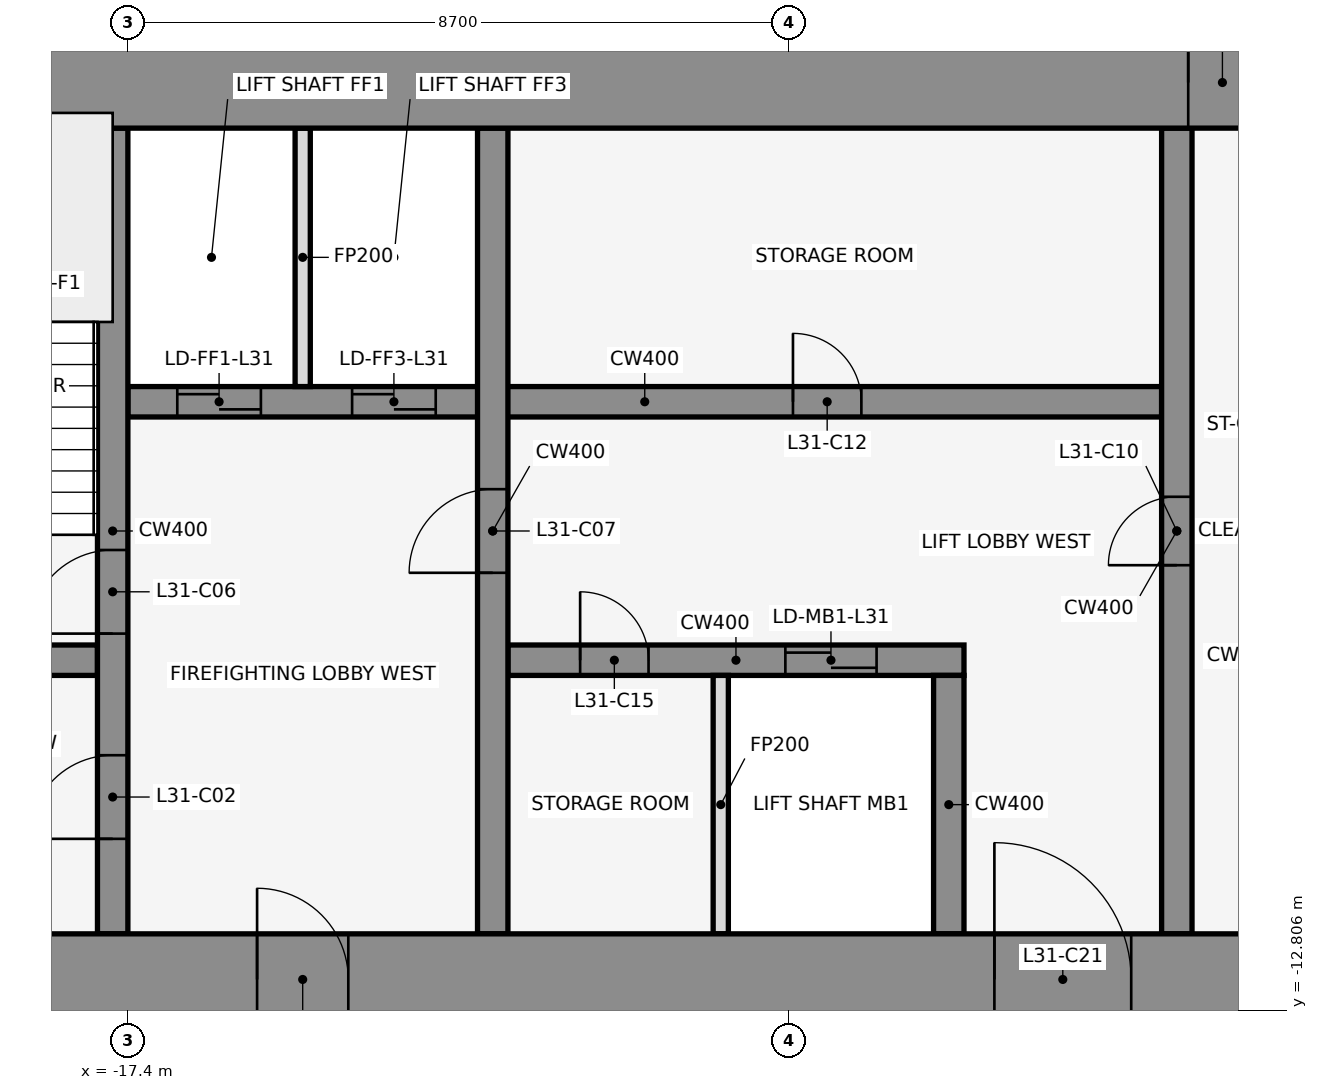
"""IFC4 building model, lengths in metres.
Left out: names, types, materials, properties, quantities, classifications, styles, units other than length and angle.
Written with IfcOpenShell. Run it as: python <this file> out.ifc"""

import sys

from ifc_helpers import new_model, si_unit, direction, frame, frame_2d, origin, place, context, subcontext, project, spatial, rectangle, extrude, element, fill, save


model = new_model("IFC4")
c1 = context("Model", 3, precision=1e-05, world=origin(), true_north=direction((0.0, 1.0)))
c2 = subcontext(c1, "Body", "Model", "MODEL_VIEW")
j1 = project(units=[si_unit("LENGTHUNIT", "METRE"), si_unit("PLANEANGLEUNIT", "RADIAN")], contexts=[c1])
p1 = place(None, origin())
s1 = spatial("IfcSite", under=j1, at=p1, CompositionType="ELEMENT")
p2 = place(p1, origin())
s2 = spatial("IfcBuilding", under=s1, at=p2, CompositionType="ELEMENT")
p3 = place(p2, frame((0.0, 0.0, 144.5)))
s3 = spatial("IfcBuildingStorey", under=s2, at=p3, CompositionType="ELEMENT", Elevation=144.5)
p4 = place(p3, frame((-14.599, 1.08, 0.0), z_axis=(0.0, 0.0, 1.0), x_axis=(-0.83981312244, -0.542875602121, 0.0)))
e1 = element("IfcWall", 1, at=p4, inside=s3, PredefinedType="STANDARD", context=c2, shape_type="SweptSolid", body=[
    extrude(rectangle(XDim=2.183, YDim=0.25, at=frame_2d((1.091, 0.0))), origin(), (0.0, 0.0, 1.0), 3.95),
])
p5 = place(p3, frame((-20.8, -8.2, 0.0), z_axis=(0.0, 0.0, 1.0), x_axis=(1.0, 0.0, 0.0)))
e2 = element("IfcWall", 2, at=p5, inside=s3, PredefinedType="SHEAR", context=c2, shape_type="SweptSolid", body=[
    extrude(rectangle(XDim=3.0, YDim=0.4, at=frame_2d((1.5, 0.0))), origin(), (0.0, 0.0, 1.0), 4.1),
])
p6 = place(p5, frame((0.85, 0.0, 0.0)))
e3 = element("IfcOpeningElement", 3, at=p6, cuts=e2, PredefinedType="OPENING", context=c2, shape_type="SweptSolid", body=[
    extrude(rectangle(XDim=1.2, YDim=2.1, at=frame_2d((0.6, 1.05))), frame((0.0, 0.212, 0.0), z_axis=(0.0, -1.0, 0.0), x_axis=(1.0, 0.0, 0.0)), (0.0, 0.0, 1.0), 0.424),
])
p7 = place(p3, frame((-12.4, -8.2, 0.0), z_axis=(0.0, 0.0, 1.0), x_axis=(1.0, 0.0, 0.0)))
e4 = element("IfcWall", 4, at=p7, inside=s3, PredefinedType="SHEAR", context=c2, shape_type="SweptSolid", body=[
    extrude(rectangle(XDim=6.0, YDim=0.4, at=frame_2d((3.0, 0.0))), origin(), (0.0, 0.0, 1.0), 4.1),
])
p8 = place(p7, frame((3.65, 0.0, 0.0)))
e5 = element("IfcOpeningElement", 5, at=p8, cuts=e4, PredefinedType="OPENING", context=c2, shape_type="SweptSolid", body=[
    extrude(rectangle(XDim=1.2, YDim=2.1, at=frame_2d((0.6, 1.05))), frame((0.0, 0.212, 0.0), z_axis=(0.0, -1.0, 0.0), x_axis=(1.0, 0.0, 0.0)), (0.0, 0.0, 1.0), 0.424),
])
p9 = place(p7, frame((0.95, 0.0, 0.0)))
e6 = element("IfcOpeningElement", 6, at=p9, cuts=e4, PredefinedType="OPENING", context=c2, shape_type="SweptSolid", body=[
    extrude(rectangle(XDim=0.9, YDim=2.1, at=frame_2d((0.45, 1.05))), frame((0.0, 0.212, 0.0), z_axis=(0.0, -1.0, 0.0), x_axis=(1.0, 0.0, 0.0)), (0.0, 0.0, 1.0), 0.424),
])
p10 = place(p3, frame((-17.4, -4.8, 0.0), z_axis=(0.0, 0.0, 1.0), x_axis=(1.0, 0.0, 0.0)))
e7 = element("IfcWall", 7, at=p10, inside=s3, PredefinedType="SHEAR", context=c2, shape_type="SweptSolid", body=[
    extrude(rectangle(XDim=13.6, YDim=0.4, at=frame_2d((6.8, 0.0))), origin(), (0.0, 0.0, 1.0), 4.1),
])
p11 = place(p10, frame((0.65, 0.0, 0.0)))
e8 = element("IfcOpeningElement", 8, at=p11, cuts=e7, PredefinedType="OPENING", context=c2, shape_type="SweptSolid", body=[
    extrude(rectangle(XDim=1.1, YDim=2.1, at=frame_2d((0.55, 1.05))), frame((0.0, 0.212, 0.0), z_axis=(0.0, -1.0, 0.0), x_axis=(1.0, 0.0, 0.0)), (0.0, 0.0, 1.0), 0.424),
])
p12 = place(p10, frame((2.95, 0.0, 0.0)))
e9 = element("IfcOpeningElement", 9, at=p12, cuts=e7, PredefinedType="OPENING", context=c2, shape_type="SweptSolid", body=[
    extrude(rectangle(XDim=1.1, YDim=2.1, at=frame_2d((0.55, 1.05))), frame((0.0, 0.212, 0.0), z_axis=(0.0, -1.0, 0.0), x_axis=(1.0, 0.0, 0.0)), (0.0, 0.0, 1.0), 0.424),
])
p13 = place(p10, frame((8.75, 0.0, 0.0)))
e10 = element("IfcOpeningElement", 10, at=p13, cuts=e7, PredefinedType="OPENING", context=c2, shape_type="SweptSolid", body=[
    extrude(rectangle(XDim=0.9, YDim=2.1, at=frame_2d((0.45, 1.05))), frame((0.0, 0.212, 0.0), z_axis=(0.0, -1.0, 0.0), x_axis=(1.0, 0.0, 0.0)), (0.0, 0.0, 1.0), 0.424),
])
p14 = place(p3, frame((-17.6, -11.8, 0.0), z_axis=(0.0, 0.0, 1.0), x_axis=(0.0, 1.0, 0.0)))
e11 = element("IfcWall", 11, at=p14, inside=s3, PredefinedType="SHEAR", context=c2, shape_type="SweptSolid", body=[
    extrude(rectangle(XDim=10.6, YDim=0.4, at=frame_2d((5.3, 0.0))), origin(), (0.0, 0.0, 1.0), 4.1),
])
p15 = place(p14, frame((1.25, 0.0, 0.0)))
e12 = element("IfcOpeningElement", 12, at=p15, cuts=e11, PredefinedType="OPENING", context=c2, shape_type="SweptSolid", body=[
    extrude(rectangle(XDim=1.1, YDim=2.1, at=frame_2d((0.55, 1.05))), frame((0.0, 0.212, 0.0), z_axis=(0.0, -1.0, 0.0), x_axis=(1.0, 0.0, 0.0)), (0.0, 0.0, 1.0), 0.424),
])
p16 = place(p14, frame((3.95, 0.0, 0.0)))
e13 = element("IfcOpeningElement", 13, at=p16, cuts=e11, PredefinedType="OPENING", context=c2, shape_type="SweptSolid", body=[
    extrude(rectangle(XDim=1.1, YDim=2.1, at=frame_2d((0.55, 1.05))), frame((0.0, 0.212, 0.0), z_axis=(0.0, -1.0, 0.0), x_axis=(1.0, 0.0, 0.0)), (0.0, 0.0, 1.0), 0.424),
])
p17 = place(p3, frame((-15.1, -4.6, 0.0), z_axis=(0.0, 0.0, 1.0), x_axis=(0.0, 1.0, 0.0)))
e14 = element("IfcWall", 14, at=p17, inside=s3, PredefinedType="PARTITIONING", context=c2, shape_type="SweptSolid", body=[
    extrude(rectangle(XDim=3.4, YDim=0.2, at=frame_2d((1.7, 0.0))), origin(), (0.0, 0.0, 1.0), 2.84),
])
p18 = place(p3, frame((-12.6, -11.8, 0.0), z_axis=(0.0, 0.0, 1.0), x_axis=(0.0, 1.0, 0.0)))
e15 = element("IfcWall", 15, at=p18, inside=s3, PredefinedType="SHEAR", context=c2, shape_type="SweptSolid", body=[
    extrude(rectangle(XDim=10.6, YDim=0.4, at=frame_2d((5.3, 0.0))), origin(), (0.0, 0.0, 1.0), 4.1),
])
p19 = place(p18, frame((4.75, 0.0, 0.0)))
e16 = element("IfcOpeningElement", 16, at=p19, cuts=e15, PredefinedType="OPENING", context=c2, shape_type="SweptSolid", body=[
    extrude(rectangle(XDim=1.1, YDim=2.1, at=frame_2d((0.55, 1.05))), frame((0.0, 0.212, 0.0), z_axis=(0.0, -1.0, 0.0), x_axis=(1.0, 0.0, 0.0)), (0.0, 0.0, 1.0), 0.424),
])
p20 = place(p3, frame((-9.6, -11.8, 0.0), z_axis=(0.0, 0.0, 1.0), x_axis=(0.0, 1.0, 0.0)))
e17 = element("IfcWall", 17, at=p20, inside=s3, PredefinedType="PARTITIONING", context=c2, shape_type="SweptSolid", body=[
    extrude(rectangle(XDim=3.4, YDim=0.2, at=frame_2d((1.7, 0.0))), origin(), (0.0, 0.0, 1.0), 2.84),
])
p21 = place(p3, frame((-6.6, -11.8, 0.0), z_axis=(0.0, 0.0, 1.0), x_axis=(0.0, 1.0, 0.0)))
e18 = element("IfcWall", 18, at=p21, inside=s3, PredefinedType="SHEAR", context=c2, shape_type="SweptSolid", body=[
    extrude(rectangle(XDim=3.4, YDim=0.4, at=frame_2d((1.7, 0.0))), origin(), (0.0, 0.0, 1.0), 4.1),
])
p22 = place(p3, frame((-3.6, -11.8, 0.0), z_axis=(0.0, 0.0, 1.0), x_axis=(0.0, 1.0, 0.0)))
e19 = element("IfcWall", 19, at=p22, inside=s3, PredefinedType="SHEAR", context=c2, shape_type="SweptSolid", body=[
    extrude(rectangle(XDim=10.6, YDim=0.4, at=frame_2d((5.3, 0.0))), origin(), (0.0, 0.0, 1.0), 4.1),
])
p23 = place(p22, frame((4.85, 0.0, 0.0)))
e20 = element("IfcOpeningElement", 20, at=p23, cuts=e19, PredefinedType="OPENING", context=c2, shape_type="SweptSolid", body=[
    extrude(rectangle(XDim=0.9, YDim=2.1, at=frame_2d((0.45, 1.05))), frame((0.0, 0.212, 0.0), z_axis=(0.0, -1.0, 0.0), x_axis=(1.0, 0.0, 0.0)), (0.0, 0.0, 1.0), 0.424),
])
p24 = place(p3, frame((-22.0, -0.6, 0.0), z_axis=(0.0, 0.0, 1.0), x_axis=(1.0, 0.0, 0.0)))
e21 = element("IfcWall", 21, at=p24, inside=s3, PredefinedType="SHEAR", context=c2, shape_type="SweptSolid", body=[
    extrude(rectangle(XDim=44.0, YDim=1.2, at=frame_2d((22.0, 0.0))), origin(), (0.0, 0.0, 1.0), 4.1),
])
p25 = place(p24, frame((18.55, 0.0, 0.0)))
e22 = element("IfcOpeningElement", 22, at=p25, cuts=e21, PredefinedType="OPENING", context=c2, shape_type="SweptSolid", body=[
    extrude(rectangle(XDim=0.9, YDim=2.1, at=frame_2d((0.45, 1.05))), frame((0.0, 0.612, 0.0), z_axis=(0.0, -1.0, 0.0), x_axis=(1.0, 0.0, 0.0)), (0.0, 0.0, 1.0), 1.224),
])
p26 = place(p24, frame((24.55, 0.0, 0.0)))
e23 = element("IfcOpeningElement", 23, at=p26, cuts=e21, PredefinedType="OPENING", context=c2, shape_type="SweptSolid", body=[
    extrude(rectangle(XDim=0.9, YDim=2.1, at=frame_2d((0.45, 1.05))), frame((0.0, 0.612, 0.0), z_axis=(0.0, -1.0, 0.0), x_axis=(1.0, 0.0, 0.0)), (0.0, 0.0, 1.0), 1.224),
])
p27 = place(p3, frame((-22.0, -12.4, 0.0), z_axis=(0.0, 0.0, 1.0), x_axis=(1.0, 0.0, 0.0)))
e24 = element("IfcWall", 24, at=p27, inside=s3, PredefinedType="SHEAR", context=c2, shape_type="SweptSolid", body=[
    extrude(rectangle(XDim=44.0, YDim=1.2, at=frame_2d((22.0, 0.0))), origin(), (0.0, 0.0, 1.0), 4.1),
])
p28 = place(p27, frame((2.2, 0.0, 0.0)))
e25 = element("IfcOpeningElement", 25, at=p28, cuts=e24, PredefinedType="OPENING", context=c2, shape_type="SweptSolid", body=[
    extrude(rectangle(XDim=1.2, YDim=2.1, at=frame_2d((0.6, 1.05))), frame((0.0, 0.612, 0.0), z_axis=(0.0, -1.0, 0.0), x_axis=(1.0, 0.0, 0.0)), (0.0, 0.0, 1.0), 1.224),
])
p29 = place(p27, frame((21.4, 0.0, 0.0)))
e26 = element("IfcOpeningElement", 26, at=p29, cuts=e24, PredefinedType="OPENING", context=c2, shape_type="SweptSolid", body=[
    extrude(rectangle(XDim=1.2, YDim=2.1, at=frame_2d((0.6, 1.05))), frame((0.0, 0.612, 0.0), z_axis=(0.0, -1.0, 0.0), x_axis=(1.0, 0.0, 0.0)), (0.0, 0.0, 1.0), 1.224),
])
p30 = place(p27, frame((40.6, 0.0, 0.0)))
e27 = element("IfcOpeningElement", 27, at=p30, cuts=e24, PredefinedType="OPENING", context=c2, shape_type="SweptSolid", body=[
    extrude(rectangle(XDim=1.2, YDim=2.1, at=frame_2d((0.6, 1.05))), frame((0.0, 0.612, 0.0), z_axis=(0.0, -1.0, 0.0), x_axis=(1.0, 0.0, 0.0)), (0.0, 0.0, 1.0), 1.224),
])
p31 = place(p27, frame((16.0, 0.0, 0.0)))
e28 = element("IfcOpeningElement", 28, at=p31, cuts=e24, PredefinedType="OPENING", context=c2, shape_type="SweptSolid", body=[
    extrude(rectangle(XDim=1.8, YDim=2.1, at=frame_2d((0.9, 1.05))), frame((0.0, 0.612, 0.0), z_axis=(0.0, -1.0, 0.0), x_axis=(1.0, 0.0, 0.0)), (0.0, 0.0, 1.0), 1.224),
])
p32 = place(p27, frame((6.3, 0.0, 0.0)))
e29 = element("IfcOpeningElement", 29, at=p32, cuts=e24, PredefinedType="OPENING", context=c2, shape_type="SweptSolid", body=[
    extrude(rectangle(XDim=1.2, YDim=2.1, at=frame_2d((0.6, 1.05))), frame((0.0, 0.612, 0.0), z_axis=(0.0, -1.0, 0.0), x_axis=(1.0, 0.0, 0.0)), (0.0, 0.0, 1.0), 1.224),
])
p33 = place(p27, frame((26.2, 0.0, 0.0)))
e30 = element("IfcOpeningElement", 30, at=p33, cuts=e24, PredefinedType="OPENING", context=c2, shape_type="SweptSolid", body=[
    extrude(rectangle(XDim=1.8, YDim=2.1, at=frame_2d((0.9, 1.05))), frame((0.0, 0.612, 0.0), z_axis=(0.0, -1.0, 0.0), x_axis=(1.0, 0.0, 0.0)), (0.0, 0.0, 1.0), 1.224),
])
p34 = place(p27, frame((36.5, 0.0, 0.0)))
e31 = element("IfcOpeningElement", 31, at=p34, cuts=e24, PredefinedType="OPENING", context=c2, shape_type="SweptSolid", body=[
    extrude(rectangle(XDim=1.2, YDim=2.1, at=frame_2d((0.6, 1.05))), frame((0.0, 0.612, 0.0), z_axis=(0.0, -1.0, 0.0), x_axis=(1.0, 0.0, 0.0)), (0.0, 0.0, 1.0), 1.224),
])
p35 = place(p15, frame((1.1, 0.0, 0.0), z_axis=(0.0, 0.0, 1.0), x_axis=(-1.0, 0.0, 0.0)))
e32 = element("IfcDoor", 32, at=p35, inside=s3, OperationType="SINGLE_SWING_LEFT", PredefinedType="DOOR", context=c2, shape_type="SweptSolid", body=[
    extrude(rectangle(XDim=1.1, YDim=2.1, at=frame_2d((0.55, 1.05))), frame((0.0, 0.025, 0.0), z_axis=(0.0, -1.0, 0.0), x_axis=(1.0, 0.0, 0.0)), (0.0, 0.0, 1.0), 0.05),
])
fill(e12, e32)
p36 = place(p11, origin())
e33 = element("IfcDoor", 33, at=p36, inside=s3, OperationType="DOUBLE_DOOR_SLIDING", PredefinedType="DOOR", context=c2, shape_type="SweptSolid", body=[
    extrude(rectangle(XDim=1.1, YDim=2.1, at=frame_2d((0.55, 1.05))), frame((0.0, 0.025, 0.0), z_axis=(0.0, -1.0, 0.0), x_axis=(1.0, 0.0, 0.0)), (0.0, 0.0, 1.0), 0.05),
])
fill(e8, e33)
p37 = place(p12, origin())
e34 = element("IfcDoor", 34, at=p37, inside=s3, OperationType="DOUBLE_DOOR_SLIDING", PredefinedType="DOOR", context=c2, shape_type="SweptSolid", body=[
    extrude(rectangle(XDim=1.1, YDim=2.1, at=frame_2d((0.55, 1.05))), frame((0.0, 0.025, 0.0), z_axis=(0.0, -1.0, 0.0), x_axis=(1.0, 0.0, 0.0)), (0.0, 0.0, 1.0), 0.05),
])
fill(e9, e34)
p38 = place(p8, origin())
e35 = element("IfcDoor", 35, at=p38, inside=s3, OperationType="DOUBLE_DOOR_SLIDING", PredefinedType="DOOR", context=c2, shape_type="SweptSolid", body=[
    extrude(rectangle(XDim=1.2, YDim=2.1, at=frame_2d((0.6, 1.05))), frame((0.0, 0.025, 0.0), z_axis=(0.0, -1.0, 0.0), x_axis=(1.0, 0.0, 0.0)), (0.0, 0.0, 1.0), 0.05),
])
fill(e5, e35)
p39 = place(p16, frame((1.1, 0.0, 0.0), z_axis=(0.0, 0.0, 1.0), x_axis=(-1.0, 0.0, 0.0)))
e36 = element("IfcDoor", 36, at=p39, inside=s3, OperationType="SINGLE_SWING_LEFT", PredefinedType="DOOR", context=c2, shape_type="SweptSolid", body=[
    extrude(rectangle(XDim=1.1, YDim=2.1, at=frame_2d((0.55, 1.05))), frame((0.0, 0.025, 0.0), z_axis=(0.0, -1.0, 0.0), x_axis=(1.0, 0.0, 0.0)), (0.0, 0.0, 1.0), 0.05),
])
fill(e13, e36)
p40 = place(p19, origin())
e37 = element("IfcDoor", 37, at=p40, inside=s3, OperationType="SINGLE_SWING_LEFT", PredefinedType="DOOR", context=c2, shape_type="SweptSolid", body=[
    extrude(rectangle(XDim=1.1, YDim=2.1, at=frame_2d((0.55, 1.05))), frame((0.0, 0.025, 0.0), z_axis=(0.0, -1.0, 0.0), x_axis=(1.0, 0.0, 0.0)), (0.0, 0.0, 1.0), 0.05),
])
fill(e16, e37)
p41 = place(p23, frame((0.9, 0.0, 0.0), z_axis=(0.0, 0.0, 1.0), x_axis=(-1.0, 0.0, 0.0)))
e38 = element("IfcDoor", 38, at=p41, inside=s3, OperationType="SINGLE_SWING_LEFT", PredefinedType="DOOR", context=c2, shape_type="SweptSolid", body=[
    extrude(rectangle(XDim=0.9, YDim=2.1, at=frame_2d((0.45, 1.05))), frame((0.0, 0.025, 0.0), z_axis=(0.0, -1.0, 0.0), x_axis=(1.0, 0.0, 0.0)), (0.0, 0.0, 1.0), 0.05),
])
fill(e20, e38)
p42 = place(p13, origin())
e39 = element("IfcDoor", 39, at=p42, inside=s3, OperationType="SINGLE_SWING_RIGHT", PredefinedType="DOOR", context=c2, shape_type="SweptSolid", body=[
    extrude(rectangle(XDim=0.9, YDim=2.1, at=frame_2d((0.45, 1.05))), frame((0.0, 0.025, 0.0), z_axis=(0.0, -1.0, 0.0), x_axis=(1.0, 0.0, 0.0)), (0.0, 0.0, 1.0), 0.05),
])
fill(e10, e39)
p43 = place(p9, frame((0.9, 0.0, 0.0), z_axis=(0.0, 0.0, 1.0), x_axis=(-1.0, 0.0, 0.0)))
e40 = element("IfcDoor", 40, at=p43, inside=s3, OperationType="SINGLE_SWING_RIGHT", PredefinedType="DOOR", context=c2, shape_type="SweptSolid", body=[
    extrude(rectangle(XDim=0.9, YDim=2.1, at=frame_2d((0.45, 1.05))), frame((0.0, 0.025, 0.0), z_axis=(0.0, -1.0, 0.0), x_axis=(1.0, 0.0, 0.0)), (0.0, 0.0, 1.0), 0.05),
])
fill(e6, e40)
p44 = place(p25, origin())
e41 = element("IfcDoor", 41, at=p44, inside=s3, OperationType="SINGLE_SWING_LEFT", PredefinedType="DOOR", context=c2, shape_type="SweptSolid", body=[
    extrude(rectangle(XDim=0.9, YDim=2.1, at=frame_2d((0.45, 1.05))), frame((0.0, 0.025, 0.0), z_axis=(0.0, -1.0, 0.0), x_axis=(1.0, 0.0, 0.0)), (0.0, 0.0, 1.0), 0.05),
])
fill(e22, e41)
p45 = place(p31, origin())
e42 = element("IfcDoor", 42, at=p45, inside=s3, OperationType="SINGLE_SWING_LEFT", PredefinedType="DOOR", context=c2, shape_type="SweptSolid", body=[
    extrude(rectangle(XDim=1.8, YDim=2.1, at=frame_2d((0.9, 1.05))), frame((0.0, 0.025, 0.0), z_axis=(0.0, -1.0, 0.0), x_axis=(1.0, 0.0, 0.0)), (0.0, 0.0, 1.0), 0.05),
])
fill(e28, e42)
p46 = place(p32, frame((1.2, 0.0, 0.0), z_axis=(0.0, 0.0, 1.0), x_axis=(-1.0, 0.0, 0.0)))
e43 = element("IfcDoor", 43, at=p46, inside=s3, OperationType="SINGLE_SWING_RIGHT", PredefinedType="DOOR", context=c2, shape_type="SweptSolid", body=[
    extrude(rectangle(XDim=1.2, YDim=2.1, at=frame_2d((0.6, 1.05))), frame((0.0, 0.025, 0.0), z_axis=(0.0, -1.0, 0.0), x_axis=(1.0, 0.0, 0.0)), (0.0, 0.0, 1.0), 0.05),
])
fill(e29, e43)
save(model, sys.argv[1])
